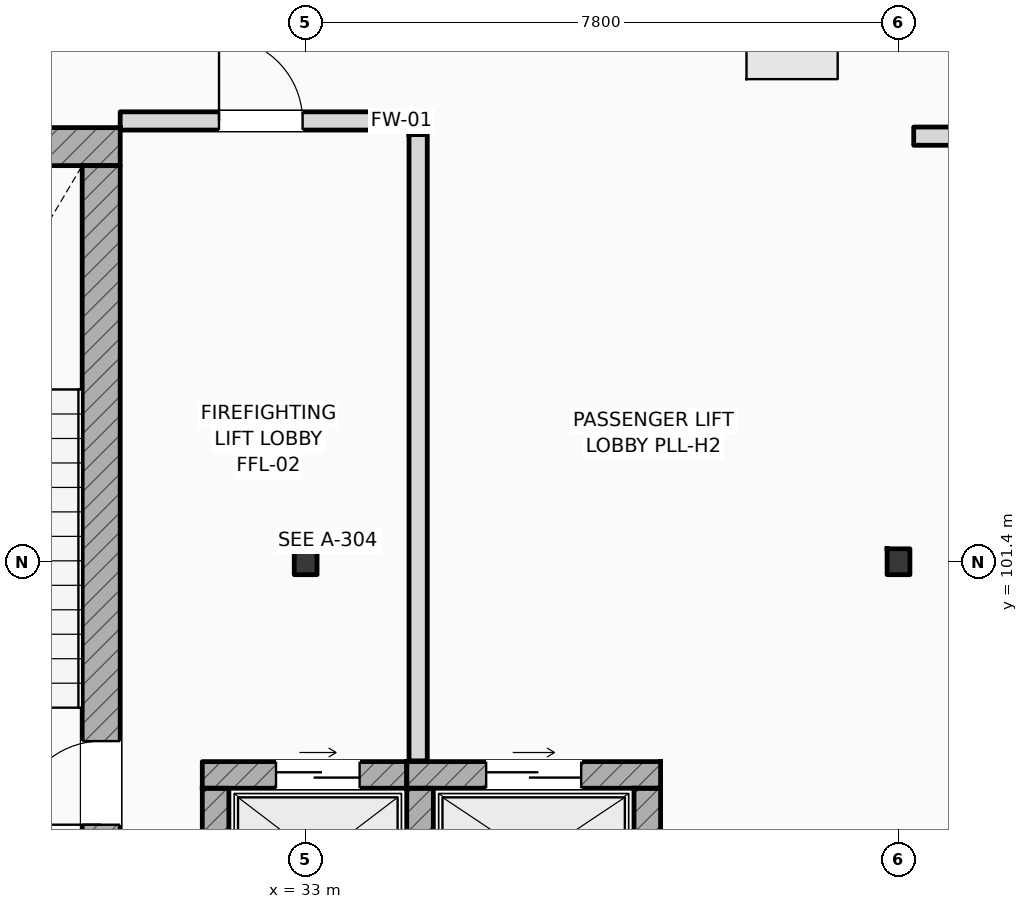
"""IFC4 building model, lengths in metres.
Left out: names, types, materials, properties, quantities, classifications, styles, units other than length and angle.
Written with IfcOpenShell. Run it as: python <this file> out.ifc"""

import sys

from ifc_helpers import new_model, si_unit, direction, frame, frame_2d, origin, origin_2d, place, context, subcontext, project, spatial, rectangle, i_section, extrude, element, fill, save


model = new_model("IFC4")
c1 = context("Model", 3, precision=1e-05, world=origin(), true_north=direction((0.0, 1.0)))
c2 = subcontext(c1, "Body", "Model", "MODEL_VIEW")
j1 = project(units=[si_unit("LENGTHUNIT", "METRE"), si_unit("PLANEANGLEUNIT", "RADIAN")], contexts=[c1])
p1 = place(None, origin())
s1 = spatial("IfcSite", under=j1, at=p1, CompositionType="ELEMENT")
p2 = place(p1, origin())
s2 = spatial("IfcBuilding", under=s1, at=p2, CompositionType="ELEMENT")
p3 = place(p2, frame((0.0, 0.0, 46.8)))
s3 = spatial("IfcBuildingStorey", under=s2, at=p3, CompositionType="ELEMENT", Elevation=46.8)
for number, where, z_axis, x_axis in (
    (1, (33.0, 101.4, 0.0), (0.0, 0.0, 1.0), (1.0, 0.0, 0.0)),
    (2, (40.8, 101.4, 0.0), (0.0, 0.0, 1.0), (1.0, 0.0, 0.0)),
):
    element("IfcColumn", number, at=place(p3, frame(where, z_axis=z_axis, x_axis=x_axis)), inside=s3, PredefinedType="COLUMN", context=c2, shape_type="SweptSolid", body=[
        extrude(i_section(OverallWidth=0.3, OverallDepth=0.34, WebThickness=0.012, FlangeThickness=0.021, FilletRadius=0.027, at=origin_2d()), origin(), (0.0, 0.0, 1.0), 4.8),
    ])
p4 = place(p3, frame((25.4, 106.862, 0.0), z_axis=(0.0, 0.0, 1.0), x_axis=(1.0, 0.0, 0.0)))
e3 = element("IfcWall", 3, at=p4, inside=s3, PredefinedType="SHEAR", context=c2, shape_type="SweptSolid", body=[
    extrude(rectangle(XDim=5.16, YDim=0.5, at=frame_2d((2.58, 0.0))), origin(), (0.0, 0.0, 1.0), 4.8),
])
p5 = place(p3, frame((30.31, 97.5, 0.0), z_axis=(0.0, 0.0, 1.0), x_axis=(0.0, 1.0, 0.0)))
e4 = element("IfcWall", 4, at=p5, inside=s3, PredefinedType="SHEAR", context=c2, shape_type="SweptSolid", body=[
    extrude(rectangle(XDim=9.112, YDim=0.5, at=frame_2d((4.556, 0.0))), origin(), (0.0, 0.0, 1.0), 4.8),
])
p6 = place(p5, frame((0.44, 0.0, 0.0)))
e5 = element("IfcOpeningElement", 5, at=p6, cuts=e4, PredefinedType="OPENING", context=c2, shape_type="SweptSolid", body=[
    extrude(rectangle(XDim=1.1, YDim=2.2, at=frame_2d((0.55, 1.1))), frame((0.0, 0.26, 0.0), z_axis=(0.0, -1.0, 0.0), x_axis=(1.0, 0.0, 0.0)), (0.0, 0.0, 1.0), 0.52),
])
p7 = place(p3, frame((31.64, 98.595, 0.0), z_axis=(0.0, 0.0, 1.0), x_axis=(1.0, 0.0, 0.0)))
e6 = element("IfcWall", 6, at=p7, inside=s3, PredefinedType="SHEAR", context=c2, shape_type="SweptSolid", body=[
    extrude(rectangle(XDim=2.69, YDim=0.35, at=frame_2d((1.345, 0.0))), origin(), (0.0, 0.0, 1.0), 4.54),
])
p8 = place(p7, frame((0.97, 0.0, 0.0)))
e7 = element("IfcOpeningElement", 7, at=p8, cuts=e6, PredefinedType="OPENING", context=c2, shape_type="SweptSolid", body=[
    extrude(rectangle(XDim=1.1, YDim=2.2, at=frame_2d((0.55, 1.1))), frame((0.0, 0.185, 0.0), z_axis=(0.0, -1.0, 0.0), x_axis=(1.0, 0.0, 0.0)), (0.0, 0.0, 1.0), 0.37),
])
p9 = place(p3, frame((31.815, 96.58, 0.0), z_axis=(0.0, 0.0, 1.0), x_axis=(0.0, 1.0, 0.0)))
e8 = element("IfcWall", 8, at=p9, inside=s3, PredefinedType="SHEAR", context=c2, shape_type="SweptSolid", body=[
    extrude(rectangle(XDim=1.84, YDim=0.35, at=frame_2d((0.92, 0.0))), origin(), (0.0, 0.0, 1.0), 4.54),
])
p10 = place(p3, frame((34.33, 98.595, 0.0), z_axis=(0.0, 0.0, 1.0), x_axis=(1.0, 0.0, 0.0)))
e9 = element("IfcWall", 9, at=p10, inside=s3, PredefinedType="SHEAR", context=c2, shape_type="SweptSolid", body=[
    extrude(rectangle(XDim=3.34, YDim=0.35, at=frame_2d((1.67, 0.0))), origin(), (0.0, 0.0, 1.0), 4.54),
])
p11 = place(p10, frame((1.045, 0.0, 0.0)))
e10 = element("IfcOpeningElement", 10, at=p11, cuts=e9, PredefinedType="OPENING", context=c2, shape_type="SweptSolid", body=[
    extrude(rectangle(XDim=1.25, YDim=2.25, at=frame_2d((0.625, 1.125))), frame((0.0, 0.185, 0.0), z_axis=(0.0, -1.0, 0.0), x_axis=(1.0, 0.0, 0.0)), (0.0, 0.0, 1.0), 0.37),
])
for number, where, z_axis, x_axis in (
    (11, (34.505, 96.58, 0.0), (0.0, 0.0, 1.0), (0.0, 1.0, 0.0)),
    (12, (37.495, 96.58, 0.0), (0.0, 0.0, 1.0), (0.0, 1.0, 0.0)),
):
    element("IfcWall", number, at=place(p3, frame(where, z_axis=z_axis, x_axis=x_axis)), inside=s3, PredefinedType="SHEAR", context=c2, shape_type="SweptSolid", body=[
        extrude(rectangle(XDim=1.84, YDim=0.35, at=frame_2d((0.92, 0.0))), origin(), (0.0, 0.0, 1.0), 4.54),
    ])
p12 = place(p3, frame((34.48, 98.78, 0.0), z_axis=(0.0, 0.0, 1.0), x_axis=(0.0, 1.0, 0.0)))
e13 = element("IfcWall", 13, at=p12, inside=s3, PredefinedType="STANDARD", context=c2, shape_type="SweptSolid", body=[
    extrude(rectangle(XDim=8.24, YDim=0.24, at=frame_2d((4.12, 0.0))), origin(), (0.0, 0.0, 1.0), 4.54),
])
p13 = place(p3, frame((30.56, 107.2, 0.0), z_axis=(0.0, 0.0, 1.0), x_axis=(1.0, 0.0, 0.0)))
e14 = element("IfcWall", 14, at=p13, inside=s3, PredefinedType="STANDARD", context=c2, shape_type="SweptSolid", body=[
    extrude(rectangle(XDim=4.1, YDim=0.24, at=frame_2d((2.05, 0.0))), origin(), (0.0, 0.0, 1.0), 4.54),
])
p14 = place(p13, frame((1.3, 0.0, 0.0)))
e15 = element("IfcOpeningElement", 15, at=p14, cuts=e14, PredefinedType="OPENING", context=c2, shape_type="SweptSolid", body=[
    extrude(rectangle(XDim=1.1, YDim=2.2, at=frame_2d((0.55, 1.1))), frame((0.0, 0.13, 0.0), z_axis=(0.0, -1.0, 0.0), x_axis=(1.0, 0.0, 0.0)), (0.0, 0.0, 1.0), 0.26),
])
p15 = place(p3, frame((41.0, 107.0, 0.0), z_axis=(0.0, 0.0, 1.0), x_axis=(1.0, 0.0, 0.0)))
e16 = element("IfcWall", 16, at=p15, inside=s3, PredefinedType="STANDARD", context=c2, shape_type="SweptSolid", body=[
    extrude(rectangle(XDim=16.75, YDim=0.24, at=frame_2d((8.375, 0.0))), origin(), (0.0, 0.0, 1.0), 4.54),
])
p16 = place(p15, frame((7.375, 0.0, 0.0)))
e17 = element("IfcOpeningElement", 17, at=p16, cuts=e16, PredefinedType="OPENING", context=c2, shape_type="SweptSolid", body=[
    extrude(rectangle(XDim=2.0, YDim=2.35, at=frame_2d((1.0, 1.175))), frame((0.0, 0.13, 0.0), z_axis=(0.0, -1.0, 0.0), x_axis=(1.0, 0.0, 0.0)), (0.0, 0.0, 1.0), 0.26),
])
p17 = place(p2, frame((0.0, 0.0, 51.6)))
p18 = place(p17, frame((0.0, 0.0, -0.26)))
p19 = place(p18, frame((39.4, 108.35, -0.01)))
p20 = place(p19, frame((0.0, 0.0, 0.22)))
e18 = element("IfcWindow", 18, at=p20, inside=s3, PartitioningType="SINGLE_PANEL", PredefinedType="SKYLIGHT", context=c2, shape_type="SweptSolid", body=[
    extrude(rectangle(XDim=1.2, YDim=1.2, at=origin_2d()), origin(), (0.0, 0.0, 1.0), 0.05),
])
p21 = place(p6, origin())
e19 = element("IfcDoor", 19, at=p21, inside=s3, OperationType="SINGLE_SWING_LEFT", PredefinedType="DOOR", context=c2, shape_type="SweptSolid", body=[
    extrude(rectangle(XDim=1.1, YDim=2.2, at=frame_2d((0.55, 1.1))), frame((0.0, 0.025, 0.0), z_axis=(0.0, -1.0, 0.0), x_axis=(1.0, 0.0, 0.0)), (0.0, 0.0, 1.0), 0.05),
])
fill(e5, e19)
p22 = place(p8, origin())
e20 = element("IfcDoor", 20, at=p22, inside=s3, OperationType="SLIDING_TO_LEFT", PredefinedType="DOOR", context=c2, shape_type="SweptSolid", body=[
    extrude(rectangle(XDim=1.1, YDim=2.2, at=frame_2d((0.55, 1.1))), frame((0.0, 0.025, 0.0), z_axis=(0.0, -1.0, 0.0), x_axis=(1.0, 0.0, 0.0)), (0.0, 0.0, 1.0), 0.05),
])
fill(e7, e20)
p23 = place(p11, origin())
e21 = element("IfcDoor", 21, at=p23, inside=s3, OperationType="SLIDING_TO_LEFT", PredefinedType="DOOR", context=c2, shape_type="SweptSolid", body=[
    extrude(rectangle(XDim=1.25, YDim=2.25, at=frame_2d((0.625, 1.125))), frame((0.0, 0.025, 0.0), z_axis=(0.0, -1.0, 0.0), x_axis=(1.0, 0.0, 0.0)), (0.0, 0.0, 1.0), 0.05),
])
fill(e10, e21)
p24 = place(p14, origin())
e22 = element("IfcDoor", 22, at=p24, inside=s3, OperationType="SINGLE_SWING_LEFT", PredefinedType="DOOR", context=c2, shape_type="SweptSolid", body=[
    extrude(rectangle(XDim=1.1, YDim=2.2, at=frame_2d((0.55, 1.1))), frame((0.0, 0.025, 0.0), z_axis=(0.0, -1.0, 0.0), x_axis=(1.0, 0.0, 0.0)), (0.0, 0.0, 1.0), 0.05),
])
fill(e15, e22)
save(model, sys.argv[1])
